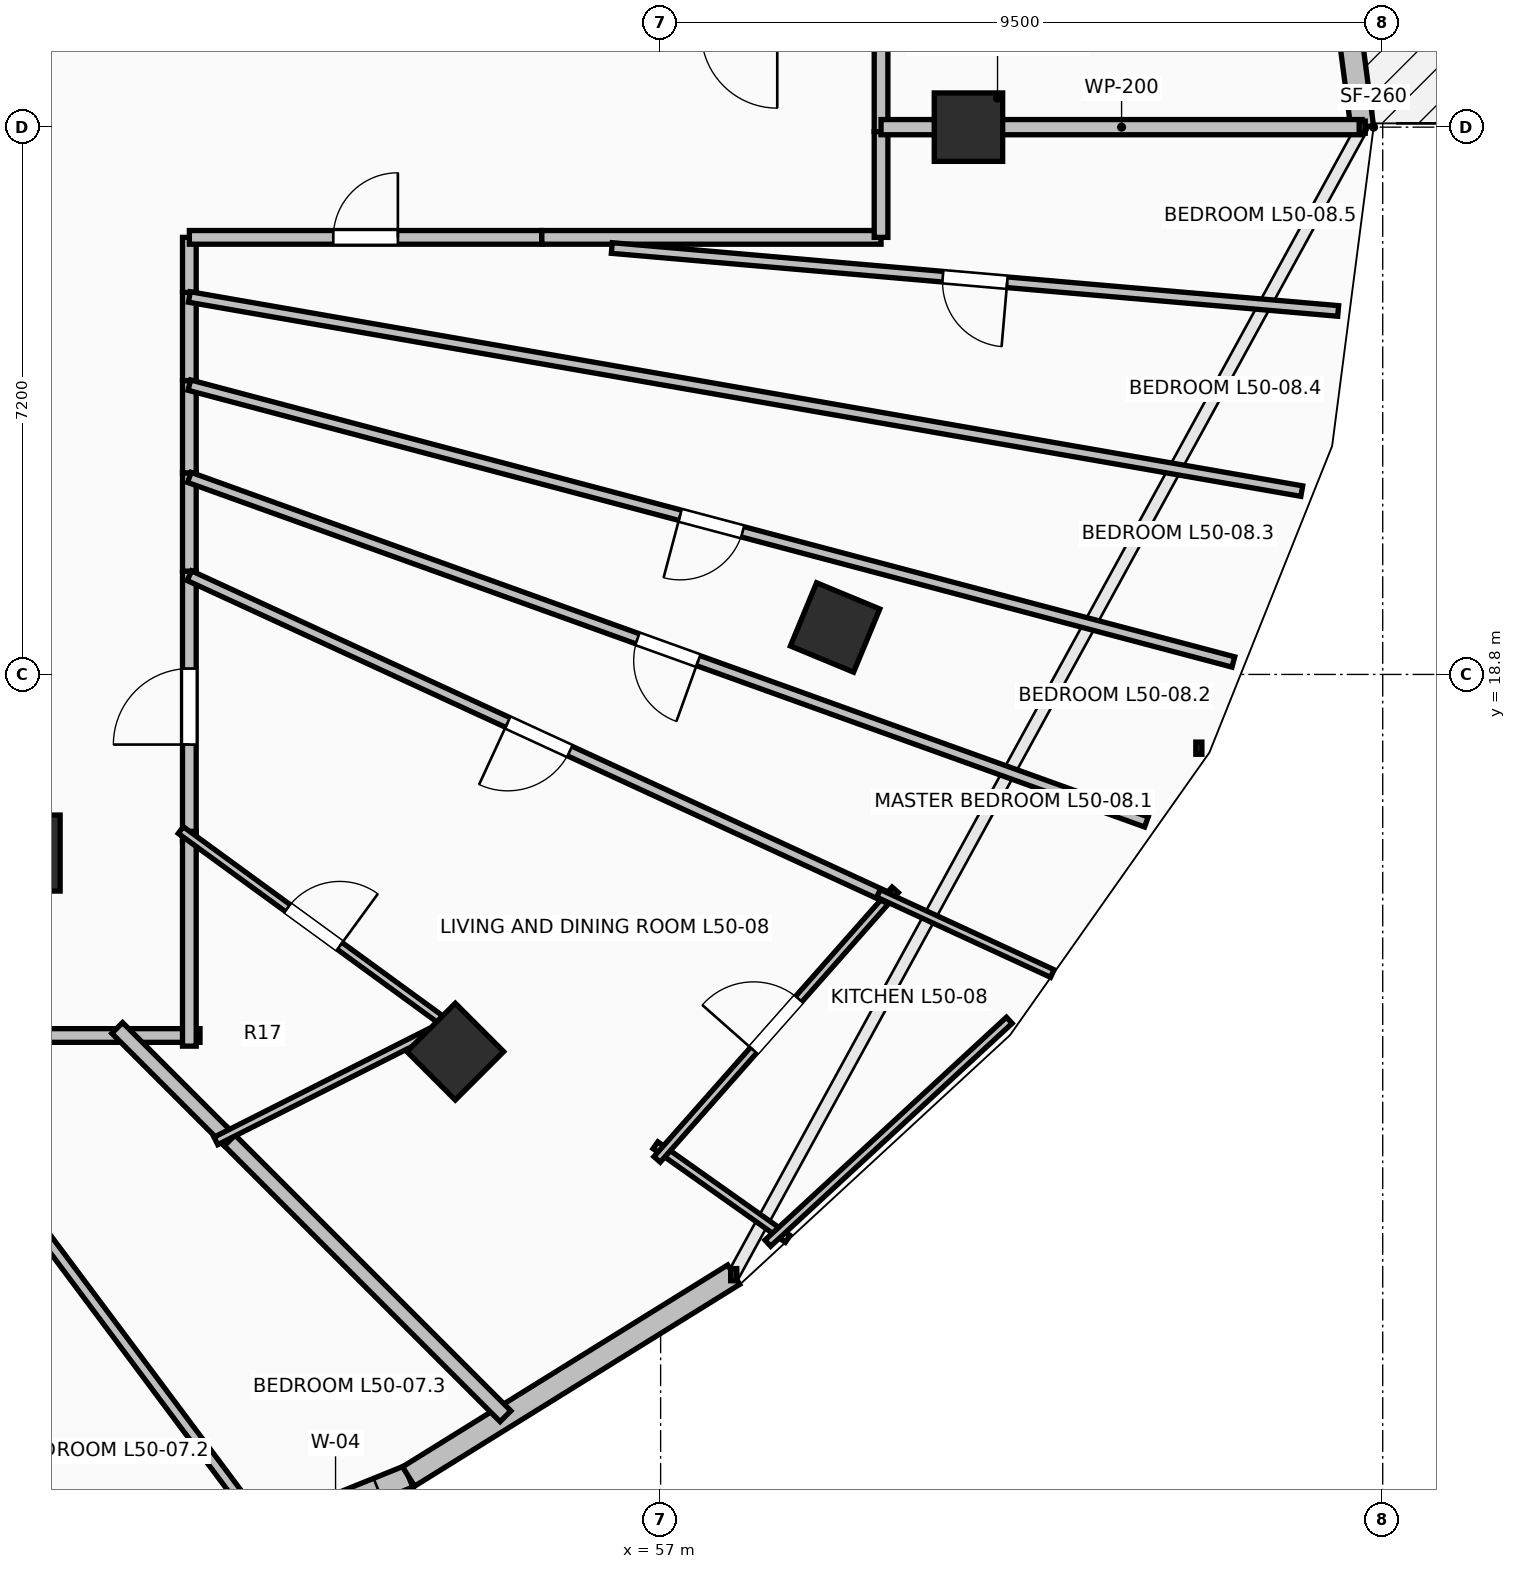
"""IFC4 building model, lengths in metres.
Left out: names, types, materials, properties, quantities, classifications, styles, units other than length and angle.
Written with IfcOpenShell. Run it as: python <this file> out.ifc"""

import sys

from ifc_helpers import new_model, si_unit, direction, frame, frame_2d, origin, origin_2d, place, context, subcontext, project, spatial, rectangle, extrude, element, fill, save


model = new_model("IFC4")
c1 = context("Model", 3, precision=1e-05, world=origin(), true_north=direction((0.0, 1.0)))
c2 = subcontext(c1, "Body", "Model", "MODEL_VIEW")
j1 = project(units=[si_unit("LENGTHUNIT", "METRE"), si_unit("PLANEANGLEUNIT", "RADIAN")], contexts=[c1])
p1 = place(None, origin())
s1 = spatial("IfcSite", under=j1, at=p1, CompositionType="ELEMENT")
p2 = place(p1, origin())
s2 = spatial("IfcBuilding", under=s1, at=p2, CompositionType="ELEMENT")
p3 = place(p2, frame((0.0, 0.0, 186.1)))
s3 = spatial("IfcBuildingStorey", under=s2, at=p3, CompositionType="ELEMENT", Elevation=186.1)
for number, where, z_axis, x_axis in (
    (1, (61.05, 26.0, 0.0), (0.0, 0.0, 1.0), (1.0, 0.0, 0.0)),
    (2, (54.299, 13.838, 0.0), (0.0, 0.0, 1.0), (0.707, -0.707, 0.0)),
    (3, (59.295, 19.418, 0.0), (0.0, 0.0, 1.0), (0.924, -0.383, 0.0)),
):
    element("IfcColumn", number, at=place(p3, frame(where, z_axis=z_axis, x_axis=x_axis)), inside=s3, PredefinedType="COLUMN", context=c2, shape_type="SweptSolid", body=[
        extrude(rectangle(XDim=0.9, YDim=0.9, at=origin_2d()), origin(), (0.0, 0.0, 1.0), 3.5),
    ])
p4 = place(p3, frame((48.75, 16.45, 0.0), z_axis=(0.0, 0.0, 1.0), x_axis=(1.0, 0.0, 0.0)))
e4 = element("IfcColumn", 4, at=p4, inside=s3, PredefinedType="PILASTER", context=c2, shape_type="SweptSolid", body=[
    extrude(rectangle(XDim=0.7, YDim=1.0, at=origin_2d()), origin(), (0.0, 0.0, 1.0), 3.5),
])
p5 = place(p3, frame((66.23, 26.0, 0.0), z_axis=(0.0, 0.0, 1.0), x_axis=(-0.129147853268, 0.991625348605, 0.0)))
e5 = element("IfcWall", 5, at=p5, inside=s3, PredefinedType="STANDARD", context=c2, shape_type="SweptSolid", body=[
    extrude(rectangle(XDim=4.2, YDim=0.3, at=frame_2d((2.1, 0.0))), origin(), (0.0, 0.0, 1.0), 3.24),
])
p6 = place(p5, frame((1.3, 0.0, 0.0)))
e6 = element("IfcOpeningElement", 6, at=p6, cuts=e5, PredefinedType="OPENING", context=c2, shape_type="SweptSolid", body=[
    extrude(rectangle(XDim=1.6, YDim=2.3, at=frame_2d((0.8, 1.15))), frame((0.0, 0.165, 0.0), z_axis=(0.0, -1.0, 0.0), x_axis=(1.0, 0.0, 0.0)), (0.0, 0.0, 1.0), 0.33),
])
p7 = place(p3, frame((48.803, 6.275, 0.0), z_axis=(0.0, 0.0, 1.0), x_axis=(0.927111094334, 0.374786630981, 0.0)))
e7 = element("IfcWall", 7, at=p7, inside=s3, PredefinedType="STANDARD", context=c2, shape_type="SweptSolid", body=[
    extrude(rectangle(XDim=5.264, YDim=0.3, at=frame_2d((2.632, 0.0))), origin(), (0.0, 0.0, 1.0), 3.24),
])
p8 = place(p7, frame((1.618, 0.0, 0.85)))
e8 = element("IfcOpeningElement", 8, at=p8, cuts=e7, PredefinedType="OPENING", context=c2, shape_type="SweptSolid", body=[
    extrude(rectangle(XDim=1.2, YDim=1.95, at=frame_2d((0.6, 0.975))), frame((0.0, 0.165, 0.0), z_axis=(0.0, -1.0, 0.0), x_axis=(1.0, 0.0, 0.0)), (0.0, 0.0, 1.0), 0.33),
])
p9 = place(p7, frame((3.628, 0.0, 0.85)))
e9 = element("IfcOpeningElement", 9, at=p9, cuts=e7, PredefinedType="OPENING", context=c2, shape_type="SweptSolid", body=[
    extrude(rectangle(XDim=1.2, YDim=1.95, at=frame_2d((0.6, 0.975))), frame((0.0, 0.165, 0.0), z_axis=(0.0, -1.0, 0.0), x_axis=(1.0, 0.0, 0.0)), (0.0, 0.0, 1.0), 0.33),
])
p10 = place(p3, frame((53.684, 8.248, 0.0), z_axis=(0.0, 0.0, 1.0), x_axis=(0.849647657754, 0.527350791858, 0.0)))
e10 = element("IfcWall", 10, at=p10, inside=s3, PredefinedType="STANDARD", context=c2, shape_type="SweptSolid", body=[
    extrude(rectangle(XDim=5.035, YDim=0.3, at=frame_2d((2.518, 0.0))), origin(), (0.0, 0.0, 1.0), 3.24),
])
p11 = place(p3, frame((59.9, 25.94, 0.0), z_axis=(0.0, 0.0, 1.0), x_axis=(0.0, 1.0, 0.0)))
e11 = element("IfcWall", 11, at=p11, inside=s3, PredefinedType="PARTITIONING", context=c2, shape_type="SweptSolid", body=[
    extrude(rectangle(XDim=1.31, YDim=0.18, at=frame_2d((0.655, 0.0))), origin(), (0.0, 0.0, 1.0), 2.432),
])
p12 = place(p3, frame((46.998, 14.05, 0.0), z_axis=(0.0, 0.0, 1.0), x_axis=(1.0, 0.0, 0.0)))
e12 = element("IfcWall", 12, at=p12, inside=s3, PredefinedType="PARTITIONING", context=c2, shape_type="SweptSolid", body=[
    extrude(rectangle(XDim=3.037, YDim=0.18, at=frame_2d((1.519, 0.0))), origin(), (0.0, 0.0, 1.0), 2.432),
])
p13 = place(p12, frame((1.094, 0.0, 0.0)))
e13 = element("IfcOpeningElement", 13, at=p13, cuts=e12, PredefinedType="OPENING", context=c2, shape_type="SweptSolid", body=[
    extrude(rectangle(XDim=0.85, YDim=2.1, at=frame_2d((0.425, 1.05))), frame((0.0, 0.105, 0.0), z_axis=(0.0, -1.0, 0.0), x_axis=(1.0, 0.0, 0.0)), (0.0, 0.0, 1.0), 0.21),
])
p14 = place(p3, frame((50.8, 16.596, 0.0), z_axis=(0.0, 0.0, 1.0), x_axis=(0.0, 1.0, 0.0)))
e14 = element("IfcWall", 14, at=p14, inside=s3, PredefinedType="PARTITIONING", context=c2, shape_type="SweptSolid", body=[
    extrude(rectangle(XDim=3.563, YDim=0.18, at=frame_2d((1.781, 0.0))), origin(), (0.0, 0.0, 1.0), 2.922),
])
p15 = place(p14, frame((1.281, 0.0, 0.0)))
e15 = element("IfcOpeningElement", 15, at=p15, cuts=e14, PredefinedType="OPENING", context=c2, shape_type="SweptSolid", body=[
    extrude(rectangle(XDim=1.0, YDim=2.15, at=frame_2d((0.5, 1.075))), frame((0.0, 0.105, 0.0), z_axis=(0.0, -1.0, 0.0), x_axis=(1.0, 0.0, 0.0)), (0.0, 0.0, 1.0), 0.21),
])
p16 = place(p3, frame((49.895, 14.05, 0.0), z_axis=(0.0, 0.0, 1.0), x_axis=(1.0, 0.0, 0.0)))
e16 = element("IfcWall", 16, at=p16, inside=s3, PredefinedType="PARTITIONING", context=c2, shape_type="SweptSolid", body=[
    extrude(rectangle(XDim=1.045, YDim=0.18, at=frame_2d((0.522, 0.0))), origin(), (0.0, 0.0, 1.0), 2.874),
])
p17 = place(p3, frame((50.8, 13.91, 0.0), z_axis=(0.0, 0.0, 1.0), x_axis=(0.0, 1.0, 0.0)))
e17 = element("IfcWall", 17, at=p17, inside=s3, PredefinedType="PARTITIONING", context=c2, shape_type="SweptSolid", body=[
    extrude(rectangle(XDim=2.826, YDim=0.18, at=frame_2d((1.413, 0.0))), origin(), (0.0, 0.0, 1.0), 2.432),
])
p18 = place(p3, frame((50.8, 20.159, 0.0), z_axis=(0.0, 0.0, 1.0), x_axis=(0.0, 1.0, 0.0)))
e18 = element("IfcWall", 18, at=p18, inside=s3, PredefinedType="PARTITIONING", context=c2, shape_type="SweptSolid", body=[
    extrude(rectangle(XDim=1.293, YDim=0.18, at=frame_2d((0.646, 0.0))), origin(), (0.0, 0.0, 1.0), 3.24),
])
p19 = place(p3, frame((50.8, 21.452, 0.0), z_axis=(0.0, 0.0, 1.0), x_axis=(0.0, 1.0, 0.0)))
e19 = element("IfcWall", 19, at=p19, inside=s3, PredefinedType="PARTITIONING", context=c2, shape_type="SweptSolid", body=[
    extrude(rectangle(XDim=1.214, YDim=0.18, at=frame_2d((0.607, 0.0))), origin(), (0.0, 0.0, 1.0), 3.24),
])
p20 = place(p3, frame((50.8, 22.666, 0.0), z_axis=(0.0, 0.0, 1.0), x_axis=(0.0, 1.0, 0.0)))
e20 = element("IfcWall", 20, at=p20, inside=s3, PredefinedType="PARTITIONING", context=c2, shape_type="SweptSolid", body=[
    extrude(rectangle(XDim=1.16, YDim=0.18, at=frame_2d((0.58, 0.0))), origin(), (0.0, 0.0, 1.0), 3.24),
])
p21 = place(p3, frame((50.8, 23.826, 0.0), z_axis=(0.0, 0.0, 1.0), x_axis=(0.0, 1.0, 0.0)))
e21 = element("IfcWall", 21, at=p21, inside=s3, PredefinedType="PARTITIONING", context=c2, shape_type="SweptSolid", body=[
    extrude(rectangle(XDim=0.724, YDim=0.18, at=frame_2d((0.362, 0.0))), origin(), (0.0, 0.0, 1.0), 3.24),
])
p22 = place(p3, frame((50.8, 24.55, 0.0), z_axis=(0.0, 0.0, 1.0), x_axis=(1.0, 0.0, 0.0)))
e22 = element("IfcWall", 22, at=p22, inside=s3, PredefinedType="PARTITIONING", context=c2, shape_type="SweptSolid", body=[
    extrude(rectangle(XDim=4.637, YDim=0.18, at=frame_2d((2.318, 0.0))), origin(), (0.0, 0.0, 1.0), 2.432),
])
p23 = place(p22, frame((1.894, 0.0, 0.0)))
e23 = element("IfcOpeningElement", 23, at=p23, cuts=e22, PredefinedType="OPENING", context=c2, shape_type="SweptSolid", body=[
    extrude(rectangle(XDim=0.85, YDim=2.1, at=frame_2d((0.425, 1.05))), frame((0.0, 0.105, 0.0), z_axis=(0.0, -1.0, 0.0), x_axis=(1.0, 0.0, 0.0)), (0.0, 0.0, 1.0), 0.21),
])
p24 = place(p3, frame((55.437, 24.55, 0.0), z_axis=(0.0, 0.0, 1.0), x_axis=(1.0, 0.0, 0.0)))
e24 = element("IfcWall", 24, at=p24, inside=s3, PredefinedType="PARTITIONING", context=c2, shape_type="SweptSolid", body=[
    extrude(rectangle(XDim=4.463, YDim=0.18, at=frame_2d((2.231, 0.0))), origin(), (0.0, 0.0, 1.0), 2.874),
])
p25 = place(p3, frame((59.9, 24.55, 0.0), z_axis=(0.0, 0.0, 1.0), x_axis=(0.0, 1.0, 0.0)))
e25 = element("IfcWall", 25, at=p25, inside=s3, PredefinedType="PARTITIONING", context=c2, shape_type="SweptSolid", body=[
    extrude(rectangle(XDim=1.39, YDim=0.18, at=frame_2d((0.695, 0.0))), origin(), (0.0, 0.0, 1.0), 2.432),
])
p26 = place(p3, frame((59.9, 26.0, 0.0), z_axis=(0.0, 0.0, 1.0), x_axis=(1.0, 0.0, 0.0)))
e26 = element("IfcWall", 26, at=p26, inside=s3, PredefinedType="PARTITIONING", context=c2, shape_type="SweptSolid", body=[
    extrude(rectangle(XDim=6.329, YDim=0.2, at=frame_2d((3.165, 0.0))), origin(), (0.0, 0.0, 1.0), 2.432),
])
p27 = place(p3, frame((51.818, 7.496, 0.0), z_axis=(0.0, 0.0, 1.0), x_axis=(-0.598399090147, 0.801198183292, 0.0)))
e27 = element("IfcWall", 27, at=p27, inside=s3, PredefinedType="PARTITIONING", context=c2, shape_type="SweptSolid", body=[
    extrude(rectangle(XDim=8.18, YDim=0.14, at=frame_2d((4.09, 0.0))), origin(), (0.0, 0.0, 1.0), 2.432),
])
p28 = place(p3, frame((54.959, 9.041, 0.0), z_axis=(0.0, 0.0, 1.0), x_axis=(-0.707106781187, 0.707106781187, 0.0)))
e28 = element("IfcWall", 28, at=p28, inside=s3, PredefinedType="PARTITIONING", context=c2, shape_type="SweptSolid", body=[
    extrude(rectangle(XDim=5.271, YDim=0.2, at=frame_2d((2.635, 0.0))), origin(), (0.0, 0.0, 1.0), 2.774),
])
p29 = place(p3, frame((51.331, 12.669, 0.0), z_axis=(0.0, 0.0, 1.0), x_axis=(-0.707106781187, 0.707106781187, 0.0)))
e29 = element("IfcWall", 29, at=p29, inside=s3, PredefinedType="PARTITIONING", context=c2, shape_type="SweptSolid", body=[
    extrude(rectangle(XDim=2.093, YDim=0.2, at=frame_2d((1.046, 0.0))), origin(), (0.0, 0.0, 1.0), 2.874),
])
p30 = place(p3, frame((50.687, 16.752, 0.0), z_axis=(0.0, 0.0, 1.0), x_axis=(0.808074646764, -0.589080100883, 0.0)))
e30 = element("IfcWall", 30, at=p30, inside=s3, PredefinedType="PARTITIONING", context=c2, shape_type="SweptSolid", body=[
    extrude(rectangle(XDim=4.329, YDim=0.11, at=frame_2d((2.165, 0.0))), origin(), (0.0, 0.0, 1.0), 2.874),
])
p31 = place(p30, frame((1.74, 0.0, 0.0)))
e31 = element("IfcOpeningElement", 31, at=p31, cuts=e30, PredefinedType="OPENING", context=c2, shape_type="SweptSolid", body=[
    extrude(rectangle(XDim=0.85, YDim=2.1, at=frame_2d((0.425, 1.05))), frame((0.0, 0.07, 0.0), z_axis=(0.0, -1.0, 0.0), x_axis=(1.0, 0.0, 0.0)), (0.0, 0.0, 1.0), 0.14),
])
p32 = place(p3, frame((53.964, 14.085, 0.0), z_axis=(0.0, 0.0, 1.0), x_axis=(-0.892546166909, -0.450956028828, 0.0)))
e32 = element("IfcWall", 32, at=p32, inside=s3, PredefinedType="PARTITIONING", context=c2, shape_type="SweptSolid", body=[
    extrude(rectangle(XDim=3.154, YDim=0.11, at=frame_2d((1.577, 0.0))), origin(), (0.0, 0.0, 1.0), 2.432),
])
p33 = place(p3, frame((58.672, 11.374, 0.0), z_axis=(0.0, 0.0, 1.0), x_axis=(-0.816262906602, 0.577680592807, 0.0)))
e33 = element("IfcWall", 33, at=p33, inside=s3, PredefinedType="PARTITIONING", context=c2, shape_type="SweptSolid", body=[
    extrude(rectangle(XDim=2.133, YDim=0.11, at=frame_2d((1.066, 0.0))), origin(), (0.0, 0.0, 1.0), 3.24),
])
p34 = place(p3, frame((56.953, 12.42, 0.0), z_axis=(0.0, 0.0, 1.0), x_axis=(0.662189711464, 0.749336230294, 0.0)))
e34 = element("IfcWall", 34, at=p34, inside=s3, PredefinedType="PARTITIONING", context=c2, shape_type="SweptSolid", body=[
    extrude(rectangle(XDim=4.732, YDim=0.11, at=frame_2d((2.366, 0.0))), origin(), (0.0, 0.0, 1.0), 3.24),
])
p35 = place(p34, frame((1.916, 0.0, 0.0)))
e35 = element("IfcOpeningElement", 35, at=p35, cuts=e34, PredefinedType="OPENING", context=c2, shape_type="SweptSolid", body=[
    extrude(rectangle(XDim=0.9, YDim=2.1, at=frame_2d((0.45, 1.05))), frame((0.0, 0.07, 0.0), z_axis=(0.0, -1.0, 0.0), x_axis=(1.0, 0.0, 0.0)), (0.0, 0.0, 1.0), 0.14),
])
p36 = place(p3, frame((58.41, 11.318, 0.0), z_axis=(0.0, 0.0, 1.0), x_axis=(0.734861902375, 0.678216768031, 0.0)))
e36 = element("IfcWall", 36, at=p36, inside=s3, PredefinedType="PARTITIONING", context=c2, shape_type="SweptSolid", body=[
    extrude(rectangle(XDim=4.323, YDim=0.11, at=frame_2d((2.162, 0.0))), origin(), (0.0, 0.0, 1.0), 3.24),
])
p37 = place(p3, frame((59.994, 15.861, 0.0), z_axis=(0.0, 0.0, 1.0), x_axis=(-0.908157621609, 0.41862839645, 0.0)))
e37 = element("IfcWall", 37, at=p37, inside=s3, PredefinedType="PARTITIONING", context=c2, shape_type="SweptSolid", body=[
    extrude(rectangle(XDim=10.124, YDim=0.14, at=frame_2d((5.062, 0.0))), origin(), (0.0, 0.0, 1.0), 2.774),
])
p38 = place(p37, frame((4.612, 0.0, 0.0)))
e38 = element("IfcOpeningElement", 38, at=p38, cuts=e37, PredefinedType="OPENING", context=c2, shape_type="SweptSolid", body=[
    extrude(rectangle(XDim=0.9, YDim=2.1, at=frame_2d((0.45, 1.05))), frame((0.0, 0.085, 0.0), z_axis=(0.0, -1.0, 0.0), x_axis=(1.0, 0.0, 0.0)), (0.0, 0.0, 1.0), 0.17),
])
p39 = place(p3, frame((62.153, 14.865, 0.0), z_axis=(0.0, 0.0, 1.0), x_axis=(-0.908101251341, 0.418750662462, 0.0)))
e39 = element("IfcWall", 39, at=p39, inside=s3, PredefinedType="PARTITIONING", context=c2, shape_type="SweptSolid", body=[
    extrude(rectangle(XDim=2.518, YDim=0.11, at=frame_2d((1.259, 0.0))), origin(), (0.0, 0.0, 1.0), 3.24),
])
p40 = place(p3, frame((63.391, 16.859, 0.0), z_axis=(0.0, 0.0, 1.0), x_axis=(-0.940877411069, 0.338747246985, 0.0)))
e40 = element("IfcWall", 40, at=p40, inside=s3, PredefinedType="PARTITIONING", context=c2, shape_type="SweptSolid", body=[
    extrude(rectangle(XDim=13.382, YDim=0.14, at=frame_2d((6.691, 0.0))), origin(), (0.0, 0.0, 1.0), 2.774),
])
p41 = place(p40, frame((6.266, 0.0, 0.0)))
e41 = element("IfcOpeningElement", 41, at=p41, cuts=e40, PredefinedType="OPENING", context=c2, shape_type="SweptSolid", body=[
    extrude(rectangle(XDim=0.85, YDim=2.1, at=frame_2d((0.425, 1.05))), frame((0.0, 0.085, 0.0), z_axis=(0.0, -1.0, 0.0), x_axis=(1.0, 0.0, 0.0)), (0.0, 0.0, 1.0), 0.17),
])
p42 = place(p3, frame((64.535, 18.964, 0.0), z_axis=(0.0, 0.0, 1.0), x_axis=(-0.966598137313, 0.256296782934, 0.0)))
e42 = element("IfcWall", 42, at=p42, inside=s3, PredefinedType="PARTITIONING", context=c2, shape_type="SweptSolid", body=[
    extrude(rectangle(XDim=14.209, YDim=0.14, at=frame_2d((7.105, 0.0))), origin(), (0.0, 0.0, 1.0), 2.432),
])
p43 = place(p42, frame((6.68, 0.0, 0.0)))
e43 = element("IfcOpeningElement", 43, at=p43, cuts=e42, PredefinedType="OPENING", context=c2, shape_type="SweptSolid", body=[
    extrude(rectangle(XDim=0.85, YDim=2.1, at=frame_2d((0.425, 1.05))), frame((0.0, 0.085, 0.0), z_axis=(0.0, -1.0, 0.0), x_axis=(1.0, 0.0, 0.0)), (0.0, 0.0, 1.0), 0.17),
])
p44 = place(p3, frame((65.435, 21.212, 0.0), z_axis=(0.0, 0.0, 1.0), x_axis=(-0.985109541297, 0.171927867563, 0.0)))
e44 = element("IfcWall", 44, at=p44, inside=s3, PredefinedType="PARTITIONING", context=c2, shape_type="SweptSolid", body=[
    extrude(rectangle(XDim=14.856, YDim=0.14, at=frame_2d((7.428, 0.0))), origin(), (0.0, 0.0, 1.0), 2.432),
])
p45 = place(p3, frame((65.914, 23.582, 0.0), z_axis=(0.0, 0.0, 1.0), x_axis=(-0.99626832952, 0.086309997072, 0.0)))
e45 = element("IfcWall", 45, at=p45, inside=s3, PredefinedType="PARTITIONING", context=c2, shape_type="SweptSolid", body=[
    extrude(rectangle(XDim=9.592, YDim=0.14, at=frame_2d((4.796, 0.0))), origin(), (0.0, 0.0, 1.0), 2.774),
])
p46 = place(p45, frame((4.371, 0.0, 0.0)))
e46 = element("IfcOpeningElement", 46, at=p46, cuts=e45, PredefinedType="OPENING", context=c2, shape_type="SweptSolid", body=[
    extrude(rectangle(XDim=0.85, YDim=2.1, at=frame_2d((0.425, 1.05))), frame((0.0, 0.085, 0.0), z_axis=(0.0, -1.0, 0.0), x_axis=(1.0, 0.0, 0.0)), (0.0, 0.0, 1.0), 0.17),
])
p47 = place(p9, origin())
e47 = element("IfcWindow", 47, at=p47, inside=s3, PartitioningType="SINGLE_PANEL", PredefinedType="WINDOW", context=c2, shape_type="SweptSolid", body=[
    extrude(rectangle(XDim=1.2, YDim=1.95, at=frame_2d((0.6, 0.975))), frame((0.0, 0.03, 0.0), z_axis=(0.0, -1.0, 0.0), x_axis=(1.0, 0.0, 0.0)), (0.0, 0.0, 1.0), 0.06),
])
fill(e9, e47)
p48 = place(p15, origin())
e48 = element("IfcDoor", 48, at=p48, inside=s3, OperationType="SINGLE_SWING_LEFT", PredefinedType="DOOR", context=c2, shape_type="SweptSolid", body=[
    extrude(rectangle(XDim=1.0, YDim=2.15, at=frame_2d((0.5, 1.075))), frame((0.0, 0.025, 0.0), z_axis=(0.0, -1.0, 0.0), x_axis=(1.0, 0.0, 0.0)), (0.0, 0.0, 1.0), 0.05),
])
fill(e15, e48)
p49 = place(p31, origin())
e49 = element("IfcDoor", 49, at=p49, inside=s3, OperationType="SINGLE_SWING_RIGHT", PredefinedType="DOOR", context=c2, shape_type="SweptSolid", body=[
    extrude(rectangle(XDim=0.85, YDim=2.1, at=frame_2d((0.425, 1.05))), frame((0.0, 0.025, 0.0), z_axis=(0.0, -1.0, 0.0), x_axis=(1.0, 0.0, 0.0)), (0.0, 0.0, 1.0), 0.05),
])
fill(e31, e49)
p50 = place(p35, origin())
e50 = element("IfcDoor", 50, at=p50, inside=s3, OperationType="SINGLE_SWING_LEFT", PredefinedType="DOOR", context=c2, shape_type="SweptSolid", body=[
    extrude(rectangle(XDim=0.9, YDim=2.1, at=frame_2d((0.45, 1.05))), frame((0.0, 0.025, 0.0), z_axis=(0.0, -1.0, 0.0), x_axis=(1.0, 0.0, 0.0)), (0.0, 0.0, 1.0), 0.05),
])
fill(e35, e50)
p51 = place(p38, origin())
e51 = element("IfcDoor", 51, at=p51, inside=s3, OperationType="SINGLE_SWING_RIGHT", PredefinedType="DOOR", context=c2, shape_type="SweptSolid", body=[
    extrude(rectangle(XDim=0.9, YDim=2.1, at=frame_2d((0.45, 1.05))), frame((0.0, 0.025, 0.0), z_axis=(0.0, -1.0, 0.0), x_axis=(1.0, 0.0, 0.0)), (0.0, 0.0, 1.0), 0.05),
])
fill(e38, e51)
p52 = place(p23, origin())
e52 = element("IfcDoor", 52, at=p52, inside=s3, OperationType="SINGLE_SWING_RIGHT", PredefinedType="DOOR", context=c2, shape_type="SweptSolid", body=[
    extrude(rectangle(XDim=0.85, YDim=2.1, at=frame_2d((0.425, 1.05))), frame((0.0, 0.025, 0.0), z_axis=(0.0, -1.0, 0.0), x_axis=(1.0, 0.0, 0.0)), (0.0, 0.0, 1.0), 0.05),
])
fill(e23, e52)
p53 = place(p41, origin())
e53 = element("IfcDoor", 53, at=p53, inside=s3, OperationType="SINGLE_SWING_LEFT", PredefinedType="DOOR", context=c2, shape_type="SweptSolid", body=[
    extrude(rectangle(XDim=0.85, YDim=2.1, at=frame_2d((0.425, 1.05))), frame((0.0, 0.025, 0.0), z_axis=(0.0, -1.0, 0.0), x_axis=(1.0, 0.0, 0.0)), (0.0, 0.0, 1.0), 0.05),
])
fill(e41, e53)
p54 = place(p43, origin())
e54 = element("IfcDoor", 54, at=p54, inside=s3, OperationType="SINGLE_SWING_RIGHT", PredefinedType="DOOR", context=c2, shape_type="SweptSolid", body=[
    extrude(rectangle(XDim=0.85, YDim=2.1, at=frame_2d((0.425, 1.05))), frame((0.0, 0.025, 0.0), z_axis=(0.0, -1.0, 0.0), x_axis=(1.0, 0.0, 0.0)), (0.0, 0.0, 1.0), 0.05),
])
fill(e43, e54)
p55 = place(p46, origin())
e55 = element("IfcDoor", 55, at=p55, inside=s3, OperationType="SINGLE_SWING_LEFT", PredefinedType="DOOR", context=c2, shape_type="SweptSolid", body=[
    extrude(rectangle(XDim=0.85, YDim=2.1, at=frame_2d((0.425, 1.05))), frame((0.0, 0.025, 0.0), z_axis=(0.0, -1.0, 0.0), x_axis=(1.0, 0.0, 0.0)), (0.0, 0.0, 1.0), 0.05),
])
fill(e46, e55)
save(model, sys.argv[1])
